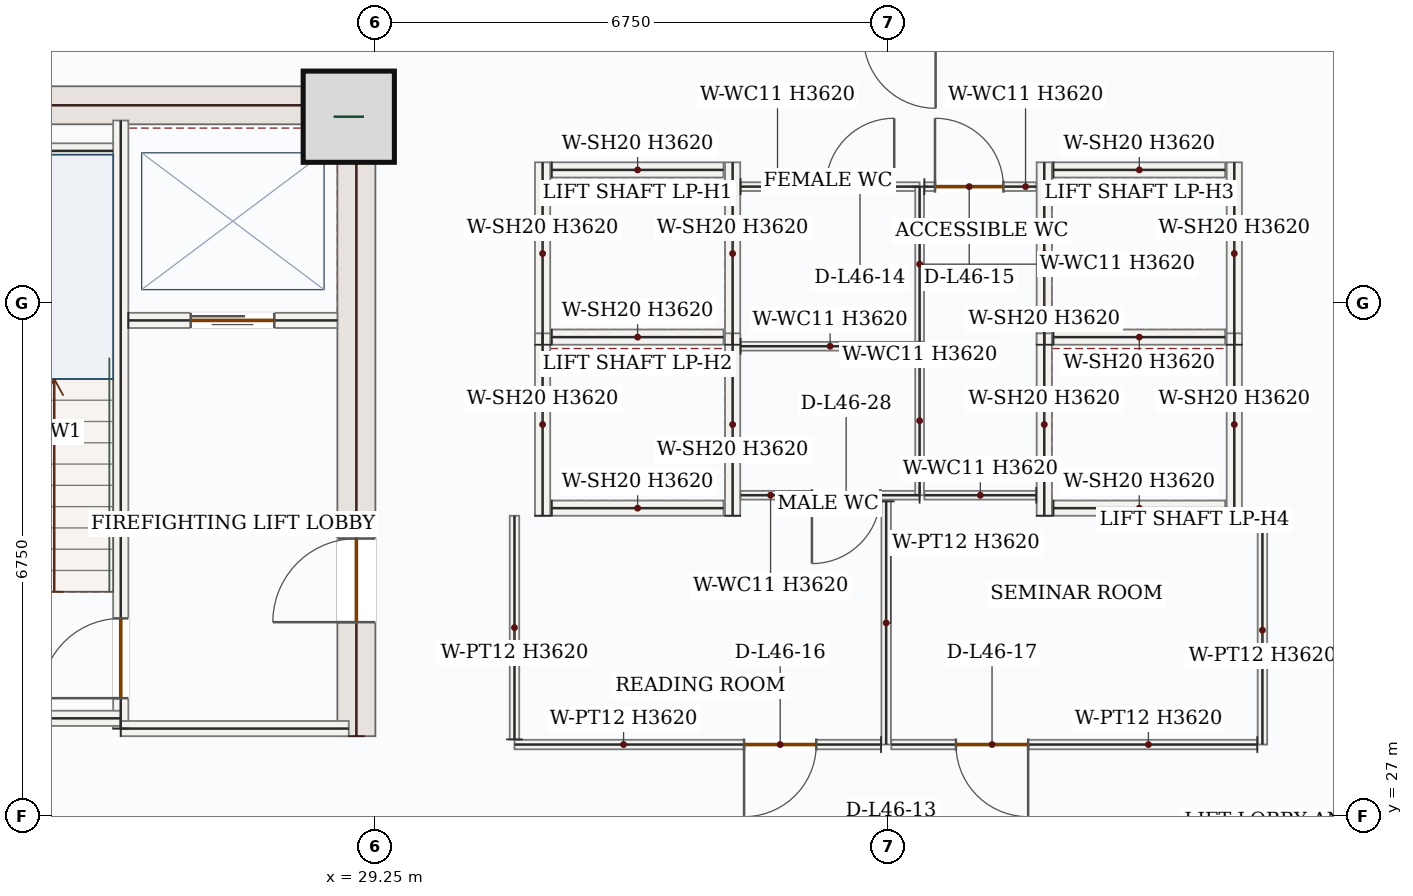
"""IFC4 building model, lengths in metres.
Left out: names, types, materials, properties, quantities, classifications, styles, units other than length and angle.
Written with IfcOpenShell. Run it as: python <this file> out.ifc"""

import sys

from ifc_helpers import new_model, si_unit, direction, frame, frame_2d, origin, origin_2d, place, context, subcontext, project, spatial, rectangle, extrude, source, transform, mapped, element, fill, save


model = new_model("IFC4")
c1 = context("Model", 3, precision=1e-05, world=origin(), true_north=direction((0.0, 1.0)))
c2 = subcontext(c1, "Body", "Model", "MODEL_VIEW")
j1 = project(units=[si_unit("LENGTHUNIT", "METRE"), si_unit("PLANEANGLEUNIT", "RADIAN")], contexts=[c1])
p1 = place(None, origin())
s1 = spatial("IfcSite", under=j1, at=p1, CompositionType="ELEMENT")
p2 = place(p1, origin())
s2 = spatial("IfcBuilding", under=s1, at=p2, CompositionType="ELEMENT")
p3 = place(p2, frame((0.0, 0.0, 198.0)))
s3 = spatial("IfcBuildingStorey", under=s2, at=p3, CompositionType="ELEMENT", Elevation=198.0)
p4 = place(p3, frame((29.0, 28.05, 0.0), z_axis=(0.0, 0.0, 1.0), x_axis=(0.0, 1.0, 0.0)))
e1 = element("IfcWall", 1, at=p4, inside=s3, PredefinedType="SHEAR", context=c2, shape_type="SweptSolid", body=[
    extrude(rectangle(XDim=8.55, YDim=0.5, at=frame_2d((4.275, 0.0))), origin(), (0.0, 0.0, 1.0), 3.62),
])
p5 = place(p4, frame((1.5, 0.0, 0.0)))
e2 = element("IfcOpeningElement", 2, at=p5, cuts=e1, PredefinedType="OPENING", context=c2, shape_type="SweptSolid", body=[
    extrude(rectangle(XDim=1.1, YDim=2.2, at=frame_2d((0.55, 1.1))), frame((0.0, 0.26, 0.0), z_axis=(0.0, -1.0, 0.0), x_axis=(1.0, 0.0, 0.0)), (0.0, 0.0, 1.0), 0.52),
])
m1 = source(origin(), c2, "Body", "SweptSolid", [
    extrude(rectangle(XDim=7.0, YDim=0.5, at=frame_2d((3.5, 0.0))), origin(), (0.0, 0.0, 1.0), 3.62),
])
p6 = place(p3, frame((21.75, 36.35, 0.0), z_axis=(0.0, 0.0, 1.0), x_axis=(1.0, 0.0, 0.0)))
e3 = element("IfcWall", 3, at=p6, inside=s3, PredefinedType="SHEAR", context=c2, shape_type="MappedRepresentation", body=[
    mapped(m1, transform((0.0, 0.0, 0.0), x_axis=(1.0, 0.0, 0.0), y_axis=(0.0, 1.0, 0.0), z_axis=(0.0, 0.0, 1.0), scale=1.0)),
])
m2 = source(origin(), c2, "Body", "SweptSolid", [
    extrude(rectangle(XDim=1.2, YDim=1.2, at=origin_2d()), origin(), (0.0, 0.0, 1.0), 3.9),
])
p7 = place(p3, frame((28.9, 36.2, 0.0), z_axis=(0.0, 0.0, 1.0), x_axis=(1.0, 0.0, 0.0)))
e4 = element("IfcColumn", 4, at=p7, inside=s3, PredefinedType="COLUMN", context=c2, shape_type="MappedRepresentation", body=[
    mapped(m2, transform((0.0, 0.0, 0.0), x_axis=(1.0, 0.0, 0.0), y_axis=(0.0, 1.0, 0.0), z_axis=(0.0, 0.0, 1.0), scale=1.0)),
])
p8 = place(p3, frame((25.9, 28.15, 0.0), z_axis=(0.0, 0.0, 1.0), x_axis=(0.0, 1.0, 0.0)))
e5 = element("IfcWall", 5, at=p8, inside=s3, PredefinedType="SOLIDWALL", context=c2, shape_type="SweptSolid", body=[
    extrude(rectangle(XDim=8.0, YDim=0.2, at=frame_2d((4.0, 0.0))), origin(), (0.0, 0.0, 1.0), 3.62),
])
p9 = place(p8, frame((0.4, 0.0, 0.0)))
e6 = element("IfcOpeningElement", 6, at=p9, cuts=e5, PredefinedType="OPENING", context=c2, shape_type="SweptSolid", body=[
    extrude(rectangle(XDim=1.05, YDim=2.15, at=frame_2d((0.525, 1.075))), frame((0.0, 0.11, 0.0), z_axis=(0.0, -1.0, 0.0), x_axis=(1.0, 0.0, 0.0)), (0.0, 0.0, 1.0), 0.22),
])
m3 = source(origin(), c2, "Body", "SweptSolid", [
    extrude(rectangle(XDim=4.25, YDim=0.2, at=frame_2d((2.125, 0.0))), origin(), (0.0, 0.0, 1.0), 3.62),
])
p10 = place(p3, frame((21.65, 28.285, 0.0), z_axis=(0.0, 0.0, 1.0), x_axis=(1.0, 0.0, 0.0)))
e7 = element("IfcWall", 7, at=p10, inside=s3, PredefinedType="SOLIDWALL", context=c2, shape_type="MappedRepresentation", body=[
    mapped(m3, transform((0.0, 0.0, 0.0), x_axis=(1.0, 0.0, 0.0), y_axis=(0.0, 1.0, 0.0), z_axis=(0.0, 0.0, 1.0), scale=1.0)),
])
m4 = source(origin(), c2, "Body", "SweptSolid", [
    extrude(rectangle(XDim=3.0, YDim=0.2, at=frame_2d((1.5, 0.0))), origin(), (0.0, 0.0, 1.0), 3.62),
])
p11 = place(p3, frame((25.9, 28.15, 0.0), z_axis=(0.0, 0.0, 1.0), x_axis=(1.0, 0.0, 0.0)))
e8 = element("IfcWall", 8, at=p11, inside=s3, PredefinedType="SOLIDWALL", context=c2, shape_type="MappedRepresentation", body=[
    mapped(m4, transform((0.0, 0.0, 0.0), x_axis=(1.0, 0.0, 0.0), y_axis=(0.0, 1.0, 0.0), z_axis=(0.0, 0.0, 1.0), scale=1.0)),
])
m5 = source(origin(), c2, "Body", "SweptSolid", [
    extrude(rectangle(XDim=3.25, YDim=0.2, at=frame_2d((1.625, 0.0))), origin(), (0.0, 0.0, 1.0), 3.62),
])
p12 = place(p3, frame((22.55, 35.75, 0.0), z_axis=(0.0, 0.0, 1.0), x_axis=(1.0, 0.0, 0.0)))
e9 = element("IfcWall", 9, at=p12, inside=s3, PredefinedType="SOLIDWALL", context=c2, shape_type="MappedRepresentation", body=[
    mapped(m5, transform((0.0, 0.0, 0.0), x_axis=(1.0, 0.0, 0.0), y_axis=(0.0, 1.0, 0.0), z_axis=(0.0, 0.0, 1.0), scale=1.0)),
])
p13 = place(p3, frame((26.0, 33.52, 0.0), z_axis=(0.0, 0.0, 1.0), x_axis=(1.0, 0.0, 0.0)))
e10 = element("IfcWall", 10, at=p13, inside=s3, PredefinedType="SOLIDWALL", context=c2, shape_type="SweptSolid", body=[
    extrude(rectangle(XDim=2.75, YDim=0.2, at=frame_2d((1.375, 0.0))), origin(), (0.0, 0.0, 1.0), 3.62),
])
p14 = place(p13, frame((0.82, 0.0, 0.0)))
e11 = element("IfcOpeningElement", 11, at=p14, cuts=e10, PredefinedType="OPENING", context=c2, shape_type="SweptSolid", body=[
    extrude(rectangle(XDim=1.1, YDim=2.15, at=frame_2d((0.55, 1.075))), frame((0.0, 0.11, 0.0), z_axis=(0.0, -1.0, 0.0), x_axis=(1.0, 0.0, 0.0)), (0.0, 0.0, 1.0), 0.22),
])
m6 = source(origin(), c2, "Body", "SweptSolid", [
    extrude(rectangle(XDim=2.4, YDim=0.2, at=frame_2d((1.2, 0.0))), origin(), (0.0, 0.0, 1.0), 3.62),
])
for number, where, z_axis, x_axis in (
    (12, (31.45, 33.2, 0.0), (0.0, 0.0, 1.0), (0.0, 1.0, 0.0)),
    (13, (33.95, 33.2, 0.0), (0.0, 0.0, 1.0), (0.0, 1.0, 0.0)),
):
    element("IfcWall", number, at=place(p3, frame(where, z_axis=z_axis, x_axis=x_axis)), inside=s3, PredefinedType="SOLIDWALL", context=c2, shape_type="MappedRepresentation", body=[
        mapped(m6, transform((0.0, 0.0, 0.0), x_axis=(1.0, 0.0, 0.0), y_axis=(0.0, 1.0, 0.0), z_axis=(0.0, 0.0, 1.0), scale=1.0)),
    ])
m7 = source(origin(), c2, "Body", "SweptSolid", [
    extrude(rectangle(XDim=2.26, YDim=0.2, at=frame_2d((1.13, 0.0))), origin(), (0.0, 0.0, 1.0), 3.62),
])
for number, where, z_axis, x_axis in (
    (14, (31.57, 33.3, 0.0), (0.0, 0.0, 1.0), (1.0, 0.0, 0.0)),
    (15, (31.57, 35.5, 0.0), (0.0, 0.0, 1.0), (1.0, 0.0, 0.0)),
):
    element("IfcWall", number, at=place(p3, frame(where, z_axis=z_axis, x_axis=x_axis)), inside=s3, PredefinedType="SOLIDWALL", context=c2, shape_type="MappedRepresentation", body=[
        mapped(m7, transform((0.0, 0.0, 0.0), x_axis=(1.0, 0.0, 0.0), y_axis=(0.0, 1.0, 0.0), z_axis=(0.0, 0.0, 1.0), scale=1.0)),
    ])
for number, where, z_axis, x_axis in (
    (16, (31.45, 30.95, 0.0), (0.0, 0.0, 1.0), (0.0, 1.0, 0.0)),
    (17, (33.95, 30.95, 0.0), (0.0, 0.0, 1.0), (0.0, 1.0, 0.0)),
):
    element("IfcWall", number, at=place(p3, frame(where, z_axis=z_axis, x_axis=x_axis)), inside=s3, PredefinedType="SOLIDWALL", context=c2, shape_type="MappedRepresentation", body=[
        mapped(m6, transform((0.0, 0.0, 0.0), x_axis=(1.0, 0.0, 0.0), y_axis=(0.0, 1.0, 0.0), z_axis=(0.0, 0.0, 1.0), scale=1.0)),
    ])
p15 = place(p3, frame((31.57, 31.05, 0.0), z_axis=(0.0, 0.0, 1.0), x_axis=(1.0, 0.0, 0.0)))
e18 = element("IfcWall", 18, at=p15, inside=s3, PredefinedType="SOLIDWALL", context=c2, shape_type="MappedRepresentation", body=[
    mapped(m7, transform((0.0, 0.0, 0.0), x_axis=(1.0, 0.0, 0.0), y_axis=(0.0, 1.0, 0.0), z_axis=(0.0, 0.0, 1.0), scale=1.0)),
])
for number, where, z_axis, x_axis in (
    (19, (38.05, 33.2, 0.0), (0.0, 0.0, 1.0), (0.0, 1.0, 0.0)),
    (20, (40.55, 33.2, 0.0), (0.0, 0.0, 1.0), (0.0, 1.0, 0.0)),
):
    element("IfcWall", number, at=place(p3, frame(where, z_axis=z_axis, x_axis=x_axis)), inside=s3, PredefinedType="SOLIDWALL", context=c2, shape_type="MappedRepresentation", body=[
        mapped(m6, transform((0.0, 0.0, 0.0), x_axis=(1.0, 0.0, 0.0), y_axis=(0.0, 1.0, 0.0), z_axis=(0.0, 0.0, 1.0), scale=1.0)),
    ])
for number, where, z_axis, x_axis in (
    (21, (38.17, 33.3, 0.0), (0.0, 0.0, 1.0), (1.0, 0.0, 0.0)),
    (22, (38.17, 35.5, 0.0), (0.0, 0.0, 1.0), (1.0, 0.0, 0.0)),
):
    element("IfcWall", number, at=place(p3, frame(where, z_axis=z_axis, x_axis=x_axis)), inside=s3, PredefinedType="SOLIDWALL", context=c2, shape_type="MappedRepresentation", body=[
        mapped(m7, transform((0.0, 0.0, 0.0), x_axis=(1.0, 0.0, 0.0), y_axis=(0.0, 1.0, 0.0), z_axis=(0.0, 0.0, 1.0), scale=1.0)),
    ])
for number, where, z_axis, x_axis in (
    (23, (38.05, 30.95, 0.0), (0.0, 0.0, 1.0), (0.0, 1.0, 0.0)),
    (24, (40.55, 30.95, 0.0), (0.0, 0.0, 1.0), (0.0, 1.0, 0.0)),
):
    element("IfcWall", number, at=place(p3, frame(where, z_axis=z_axis, x_axis=x_axis)), inside=s3, PredefinedType="SOLIDWALL", context=c2, shape_type="MappedRepresentation", body=[
        mapped(m6, transform((0.0, 0.0, 0.0), x_axis=(1.0, 0.0, 0.0), y_axis=(0.0, 1.0, 0.0), z_axis=(0.0, 0.0, 1.0), scale=1.0)),
    ])
p16 = place(p3, frame((38.17, 31.05, 0.0), z_axis=(0.0, 0.0, 1.0), x_axis=(1.0, 0.0, 0.0)))
e25 = element("IfcWall", 25, at=p16, inside=s3, PredefinedType="SOLIDWALL", context=c2, shape_type="MappedRepresentation", body=[
    mapped(m7, transform((0.0, 0.0, 0.0), x_axis=(1.0, 0.0, 0.0), y_axis=(0.0, 1.0, 0.0), z_axis=(0.0, 0.0, 1.0), scale=1.0)),
])
p17 = place(p3, frame((36.41, 31.22, 0.0), z_axis=(0.0, 0.0, 1.0), x_axis=(-1.0, 0.0, 0.0)))
e26 = element("IfcWall", 26, at=p17, inside=s3, PredefinedType="PARTITIONING", context=c2, shape_type="SweptSolid", body=[
    extrude(rectangle(XDim=2.355, YDim=0.115, at=frame_2d((1.177, 0.0))), origin(), (0.0, 0.0, 1.0), 3.62),
])
p18 = place(p17, frame((0.517, 0.0, 0.0)))
e27 = element("IfcOpeningElement", 27, at=p18, cuts=e26, PredefinedType="OPENING", context=c2, shape_type="SweptSolid", body=[
    extrude(rectangle(XDim=0.9, YDim=2.1, at=frame_2d((0.45, 1.05))), frame((0.0, 0.067, 0.0), z_axis=(0.0, -1.0, 0.0), x_axis=(1.0, 0.0, 0.0)), (0.0, 0.0, 1.0), 0.135),
])
m8 = source(origin(), c2, "Body", "SweptSolid", [
    extrude(rectangle(XDim=2.355, YDim=0.115, at=frame_2d((1.177, 0.0))), origin(), (0.0, 0.0, 1.0), 3.62),
])
p19 = place(p3, frame((34.055, 33.18, 0.0), z_axis=(0.0, 0.0, 1.0), x_axis=(1.0, 0.0, 0.0)))
e28 = element("IfcWall", 28, at=p19, inside=s3, PredefinedType="PARTITIONING", context=c2, shape_type="MappedRepresentation", body=[
    mapped(m8, transform((0.0, 0.0, 0.0), x_axis=(1.0, 0.0, 0.0), y_axis=(0.0, 1.0, 0.0), z_axis=(0.0, 0.0, 1.0), scale=1.0)),
])
m9 = source(origin(), c2, "Body", "SweptSolid", [
    extrude(rectangle(XDim=1.96, YDim=0.115, at=frame_2d((0.98, 0.0))), origin(), (0.0, 0.0, 1.0), 3.62),
])
p20 = place(p3, frame((36.41, 33.18, 0.0), z_axis=(0.0, 0.0, 1.0), x_axis=(0.0, -1.0, 0.0)))
e29 = element("IfcWall", 29, at=p20, inside=s3, PredefinedType="PARTITIONING", context=c2, shape_type="MappedRepresentation", body=[
    mapped(m9, transform((0.0, 0.0, 0.0), x_axis=(1.0, 0.0, 0.0), y_axis=(0.0, 1.0, 0.0), z_axis=(0.0, 0.0, 1.0), scale=1.0)),
])
p21 = place(p3, frame((34.055, 35.28, 0.0), z_axis=(0.0, 0.0, 1.0), x_axis=(1.0, 0.0, 0.0)))
e30 = element("IfcWall", 30, at=p21, inside=s3, PredefinedType="PARTITIONING", context=c2, shape_type="SweptSolid", body=[
    extrude(rectangle(XDim=2.355, YDim=0.115, at=frame_2d((1.177, 0.0))), origin(), (0.0, 0.0, 1.0), 3.62),
])
p22 = place(p21, frame((1.121, 0.0, 0.0)))
e31 = element("IfcOpeningElement", 31, at=p22, cuts=e30, PredefinedType="OPENING", context=c2, shape_type="SweptSolid", body=[
    extrude(rectangle(XDim=0.9, YDim=2.1, at=frame_2d((0.45, 1.05))), frame((0.0, 0.067, 0.0), z_axis=(0.0, -1.0, 0.0), x_axis=(1.0, 0.0, 0.0)), (0.0, 0.0, 1.0), 0.135),
])
m10 = source(origin(), c2, "Body", "SweptSolid", [
    extrude(rectangle(XDim=2.04, YDim=0.115, at=frame_2d((1.02, 0.0))), origin(), (0.0, 0.0, 1.0), 3.62),
])
p23 = place(p3, frame((36.41, 35.28, 0.0), z_axis=(0.0, 0.0, 1.0), x_axis=(0.0, -1.0, 0.0)))
e32 = element("IfcWall", 32, at=p23, inside=s3, PredefinedType="PARTITIONING", context=c2, shape_type="MappedRepresentation", body=[
    mapped(m10, transform((0.0, 0.0, 0.0), x_axis=(1.0, 0.0, 0.0), y_axis=(0.0, 1.0, 0.0), z_axis=(0.0, 0.0, 1.0), scale=1.0)),
])
m11 = source(origin(), c2, "Body", "SweptSolid", [
    extrude(rectangle(XDim=1.473, YDim=0.115, at=frame_2d((0.736, 0.0))), origin(), (0.0, 0.0, 1.0), 3.62),
])
p24 = place(p3, frame((37.945, 31.22, 0.0), z_axis=(0.0, 0.0, 1.0), x_axis=(-1.0, 0.0, 0.0)))
e33 = element("IfcWall", 33, at=p24, inside=s3, PredefinedType="PARTITIONING", context=c2, shape_type="MappedRepresentation", body=[
    mapped(m11, transform((0.0, 0.0, 0.0), x_axis=(1.0, 0.0, 0.0), y_axis=(0.0, 1.0, 0.0), z_axis=(0.0, 0.0, 1.0), scale=1.0)),
])
p25 = place(p3, frame((36.472, 35.28, 0.0), z_axis=(0.0, 0.0, 1.0), x_axis=(1.0, 0.0, 0.0)))
e34 = element("IfcWall", 34, at=p25, inside=s3, PredefinedType="PARTITIONING", context=c2, shape_type="SweptSolid", body=[
    extrude(rectangle(XDim=1.473, YDim=0.115, at=frame_2d((0.736, 0.0))), origin(), (0.0, 0.0, 1.0), 3.62),
])
p26 = place(p25, frame((0.14, 0.0, 0.0)))
e35 = element("IfcOpeningElement", 35, at=p26, cuts=e34, PredefinedType="OPENING", context=c2, shape_type="SweptSolid", body=[
    extrude(rectangle(XDim=0.9, YDim=2.1, at=frame_2d((0.45, 1.05))), frame((0.0, 0.067, 0.0), z_axis=(0.0, -1.0, 0.0), x_axis=(1.0, 0.0, 0.0)), (0.0, 0.0, 1.0), 0.135),
])
m12 = source(origin(), c2, "Body", "SweptSolid", [
    extrude(rectangle(XDim=3.2, YDim=0.125, at=frame_2d((1.6, 0.0))), origin(), (0.0, 0.0, 1.0), 3.62),
])
p27 = place(p3, frame((35.97, 31.14, 0.0), z_axis=(0.0, 0.0, 1.0), x_axis=(0.0, -1.0, 0.0)))
e36 = element("IfcWall", 36, at=p27, inside=s3, PredefinedType="PARTITIONING", context=c2, shape_type="MappedRepresentation", body=[
    mapped(m12, transform((0.0, 0.0, 0.0), x_axis=(1.0, 0.0, 0.0), y_axis=(0.0, 1.0, 0.0), z_axis=(0.0, 0.0, 1.0), scale=1.0)),
])
p28 = place(p3, frame((35.903, 27.94, 0.0), z_axis=(0.0, 0.0, 1.0), x_axis=(-1.0, 0.0, 0.0)))
e37 = element("IfcWall", 37, at=p28, inside=s3, PredefinedType="PARTITIONING", context=c2, shape_type="SweptSolid", body=[
    extrude(rectangle(XDim=4.823, YDim=0.125, at=frame_2d((2.411, 0.0))), origin(), (0.0, 0.0, 1.0), 3.62),
])
p29 = place(p28, frame((0.852, 0.0, 0.0)))
e38 = element("IfcOpeningElement", 38, at=p29, cuts=e37, PredefinedType="OPENING", context=c2, shape_type="SweptSolid", body=[
    extrude(rectangle(XDim=0.95, YDim=2.15, at=frame_2d((0.475, 1.075))), frame((0.0, 0.073, 0.0), z_axis=(0.0, -1.0, 0.0), x_axis=(1.0, 0.0, 0.0)), (0.0, 0.0, 1.0), 0.145),
])
m13 = source(origin(), c2, "Body", "SweptSolid", [
    extrude(rectangle(XDim=2.942, YDim=0.125, at=frame_2d((1.471, 0.0))), origin(), (0.0, 0.0, 1.0), 3.62),
])
p30 = place(p3, frame((31.08, 28.008, 0.0), z_axis=(0.0, 0.0, 1.0), x_axis=(0.0, 1.0, 0.0)))
e39 = element("IfcWall", 39, at=p30, inside=s3, PredefinedType="PARTITIONING", context=c2, shape_type="MappedRepresentation", body=[
    mapped(m13, transform((0.0, 0.0, 0.0), x_axis=(1.0, 0.0, 0.0), y_axis=(0.0, 1.0, 0.0), z_axis=(0.0, 0.0, 1.0), scale=1.0)),
])
m14 = source(origin(), c2, "Body", "SweptSolid", [
    extrude(rectangle(XDim=3.01, YDim=0.125, at=frame_2d((1.505, 0.0))), origin(), (0.0, 0.0, 1.0), 3.62),
])
p31 = place(p3, frame((40.92, 30.95, 0.0), z_axis=(0.0, 0.0, 1.0), x_axis=(0.0, -1.0, 0.0)))
e40 = element("IfcWall", 40, at=p31, inside=s3, PredefinedType="PARTITIONING", context=c2, shape_type="MappedRepresentation", body=[
    mapped(m14, transform((0.0, 0.0, 0.0), x_axis=(1.0, 0.0, 0.0), y_axis=(0.0, 1.0, 0.0), z_axis=(0.0, 0.0, 1.0), scale=1.0)),
])
p32 = place(p3, frame((40.853, 27.94, 0.0), z_axis=(0.0, 0.0, 1.0), x_axis=(-1.0, 0.0, 0.0)))
e41 = element("IfcWall", 41, at=p32, inside=s3, PredefinedType="PARTITIONING", context=c2, shape_type="SweptSolid", body=[
    extrude(rectangle(XDim=4.815, YDim=0.125, at=frame_2d((2.407, 0.0))), origin(), (0.0, 0.0, 1.0), 3.62),
])
p33 = place(p32, frame((3.015, 0.0, 0.0)))
e42 = element("IfcOpeningElement", 42, at=p33, cuts=e41, PredefinedType="OPENING", context=c2, shape_type="SweptSolid", body=[
    extrude(rectangle(XDim=0.95, YDim=2.15, at=frame_2d((0.475, 1.075))), frame((0.0, 0.073, 0.0), z_axis=(0.0, -1.0, 0.0), x_axis=(1.0, 0.0, 0.0)), (0.0, 0.0, 1.0), 0.145),
])
m15 = source(origin(), c2, "Body", "SweptSolid", [
    extrude(rectangle(XDim=1.05, YDim=2.15, at=frame_2d((0.525, 1.075))), frame((0.0, 0.025, 0.0), z_axis=(0.0, -1.0, 0.0), x_axis=(1.0, 0.0, 0.0)), (0.0, 0.0, 1.0), 0.05),
])
p34 = place(p9, origin())
e43 = element("IfcDoor", 43, at=p34, inside=s3, OperationType="SINGLE_SWING_LEFT", PredefinedType="DOOR", context=c2, shape_type="MappedRepresentation", body=[
    mapped(m15, transform((0.0, 0.0, 0.0), x_axis=(1.0, 0.0, 0.0), y_axis=(0.0, 1.0, 0.0), z_axis=(0.0, 0.0, 1.0), scale=1.0)),
])
fill(e6, e43)
m16 = source(origin(), c2, "Body", "SweptSolid", [
    extrude(rectangle(XDim=1.1, YDim=2.15, at=frame_2d((0.55, 1.075))), frame((0.0, 0.025, 0.0), z_axis=(0.0, -1.0, 0.0), x_axis=(1.0, 0.0, 0.0)), (0.0, 0.0, 1.0), 0.05),
])
p35 = place(p14, origin())
e44 = element("IfcDoor", 44, at=p35, inside=s3, OperationType="DOUBLE_DOOR_SLIDING", PredefinedType="DOOR", context=c2, shape_type="MappedRepresentation", body=[
    mapped(m16, transform((0.0, 0.0, 0.0), x_axis=(1.0, 0.0, 0.0), y_axis=(0.0, 1.0, 0.0), z_axis=(0.0, 0.0, 1.0), scale=1.0)),
])
fill(e11, e44)
m17 = source(origin(), c2, "Body", "SweptSolid", [
    extrude(rectangle(XDim=1.1, YDim=2.2, at=frame_2d((0.55, 1.1))), frame((0.0, 0.025, 0.0), z_axis=(0.0, -1.0, 0.0), x_axis=(1.0, 0.0, 0.0)), (0.0, 0.0, 1.0), 0.05),
])
p36 = place(p5, origin())
e45 = element("IfcDoor", 45, at=p36, inside=s3, OperationType="SINGLE_SWING_LEFT", PredefinedType="DOOR", context=c2, shape_type="MappedRepresentation", body=[
    mapped(m17, transform((0.0, 0.0, 0.0), x_axis=(1.0, 0.0, 0.0), y_axis=(0.0, 1.0, 0.0), z_axis=(0.0, 0.0, 1.0), scale=1.0)),
])
fill(e2, e45)
m18 = source(origin(), c2, "Body", "SweptSolid", [
    extrude(rectangle(XDim=0.9, YDim=2.1, at=frame_2d((0.45, 1.05))), frame((0.0, 0.025, 0.0), z_axis=(0.0, -1.0, 0.0), x_axis=(1.0, 0.0, 0.0)), (0.0, 0.0, 1.0), 0.05),
])
p37 = place(p22, origin())
e46 = element("IfcDoor", 46, at=p37, inside=s3, OperationType="SINGLE_SWING_RIGHT", PredefinedType="DOOR", context=c2, shape_type="MappedRepresentation", body=[
    mapped(m18, transform((0.0, 0.0, 0.0), x_axis=(1.0, 0.0, 0.0), y_axis=(0.0, 1.0, 0.0), z_axis=(0.0, 0.0, 1.0), scale=1.0)),
])
fill(e31, e46)
p38 = place(p26, origin())
e47 = element("IfcDoor", 47, at=p38, inside=s3, OperationType="SINGLE_SWING_LEFT", PredefinedType="DOOR", context=c2, shape_type="MappedRepresentation", body=[
    mapped(m18, transform((0.0, 0.0, 0.0), x_axis=(1.0, 0.0, 0.0), y_axis=(0.0, 1.0, 0.0), z_axis=(0.0, 0.0, 1.0), scale=1.0)),
])
fill(e35, e47)
m19 = source(origin(), c2, "Body", "SweptSolid", [
    extrude(rectangle(XDim=0.95, YDim=2.15, at=frame_2d((0.475, 1.075))), frame((0.0, 0.025, 0.0), z_axis=(0.0, -1.0, 0.0), x_axis=(1.0, 0.0, 0.0)), (0.0, 0.0, 1.0), 0.05),
])
p39 = place(p29, origin())
e48 = element("IfcDoor", 48, at=p39, inside=s3, OperationType="SINGLE_SWING_RIGHT", PredefinedType="DOOR", context=c2, shape_type="MappedRepresentation", body=[
    mapped(m19, transform((0.0, 0.0, 0.0), x_axis=(1.0, 0.0, 0.0), y_axis=(0.0, 1.0, 0.0), z_axis=(0.0, 0.0, 1.0), scale=1.0)),
])
fill(e38, e48)
p40 = place(p33, origin())
e49 = element("IfcDoor", 49, at=p40, inside=s3, OperationType="SINGLE_SWING_LEFT", PredefinedType="DOOR", context=c2, shape_type="MappedRepresentation", body=[
    mapped(m19, transform((0.0, 0.0, 0.0), x_axis=(1.0, 0.0, 0.0), y_axis=(0.0, 1.0, 0.0), z_axis=(0.0, 0.0, 1.0), scale=1.0)),
])
fill(e42, e49)
p41 = place(p18, origin())
e50 = element("IfcDoor", 50, at=p41, inside=s3, OperationType="SINGLE_SWING_RIGHT", PredefinedType="DOOR", context=c2, shape_type="MappedRepresentation", body=[
    mapped(m18, transform((0.0, 0.0, 0.0), x_axis=(1.0, 0.0, 0.0), y_axis=(0.0, 1.0, 0.0), z_axis=(0.0, 0.0, 1.0), scale=1.0)),
])
fill(e27, e50)
save(model, sys.argv[1])
